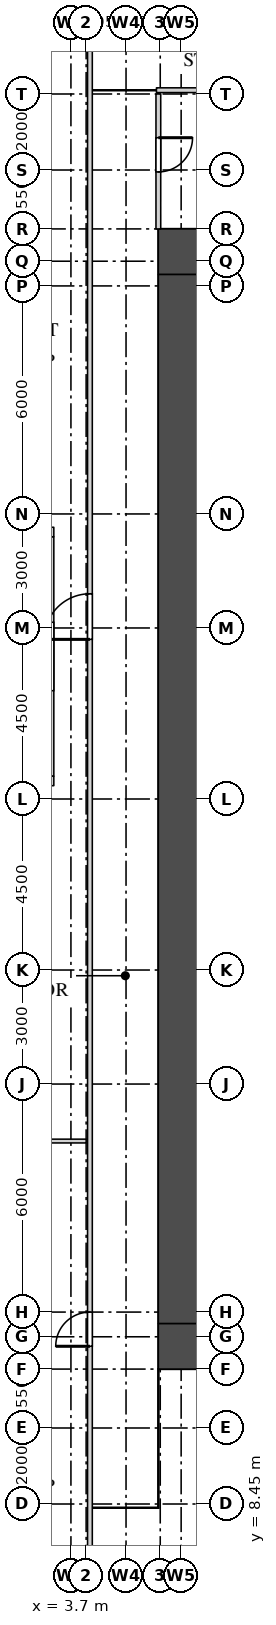
"""IFC4 building model, lengths in metres.
Left out: names, types, materials, properties, quantities, classifications, styles, units other than length and angle.
Written with IfcOpenShell. Run it as: python <this file> out.ifc"""

import sys

from ifc_helpers import new_model, si_unit, direction, frame, frame_2d, origin, place, context, subcontext, project, spatial, rectangle, extrude, source, transform, mapped, element, fill, save


model = new_model("IFC4")
c1 = context("Model", 3, precision=1e-05, world=origin(), true_north=direction((0.0, 1.0)))
c2 = subcontext(c1, "Body", "Model", "MODEL_VIEW")
j1 = project(units=[si_unit("LENGTHUNIT", "METRE"), si_unit("PLANEANGLEUNIT", "RADIAN")], contexts=[c1])
p1 = place(None, origin())
s1 = spatial("IfcSite", under=j1, at=p1, CompositionType="ELEMENT")
p2 = place(p1, origin())
s2 = spatial("IfcBuilding", under=s1, at=p2, CompositionType="ELEMENT")
p3 = place(p2, frame((0.0, 0.0, 60.0)))
s3 = spatial("IfcBuildingStorey", under=s2, at=p3, CompositionType="ELEMENT", Elevation=60.0)
m1 = source(origin(), c2, "Body", "SweptSolid", [
    extrude(rectangle(XDim=1.2, YDim=1.2, at=frame_2d((0.6, 0.0))), origin(), (0.0, 0.0, 1.0), 4.2),
])
for number, where, z_axis, x_axis in (
    (1, (6.0, 41.4, 0.0), (0.0, 0.0, 1.0), (1.0, 0.0, 0.0)),
    (2, (6.0, 12.6, 0.0), (0.0, 0.0, 1.0), (1.0, 0.0, 0.0)),
):
    element("IfcWall", number, at=place(p3, frame(where, z_axis=z_axis, x_axis=x_axis)), inside=s3, PredefinedType="SHEAR", context=c2, shape_type="MappedRepresentation", body=[
        mapped(m1, transform((0.0, 0.0, 0.0))),
    ])
m2 = source(origin(), c2, "Body", "SweptSolid", [
    extrude(rectangle(XDim=27.6, YDim=1.2, at=frame_2d((13.8, 0.0))), origin(), (0.0, 0.0, 1.0), 4.2),
])
p4 = place(p3, frame((6.6, 13.2, 0.0), z_axis=(0.0, 0.0, 1.0), x_axis=(0.0, 1.0, 0.0)))
e3 = element("IfcWall", 3, at=p4, inside=s3, PredefinedType="SHEAR", context=c2, shape_type="MappedRepresentation", body=[
    mapped(m2, transform((0.0, 0.0, 0.0))),
])
m3 = source(origin(), c2, "Body", "SweptSolid", [
    extrude(rectangle(XDim=6.3, YDim=0.25, at=frame_2d((3.15, 0.0))), origin(), (0.0, 0.0, 1.0), 4.2),
])
p5 = place(p3, frame((3.125, 27.6, 0.0), z_axis=(0.0, 0.0, 1.0), x_axis=(0.0, 1.0, 0.0)))
e4 = element("IfcWall", 4, at=p5, inside=s3, PredefinedType="SOLIDWALL", context=c2, shape_type="MappedRepresentation", body=[
    mapped(m3, transform((0.0, 0.0, 0.0))),
])
m4 = source(origin(), c2, "Body", "SweptSolid", [
    extrude(rectangle(XDim=1.6, YDim=2.4, at=frame_2d((0.8, 1.2))), frame((0.0, 0.135, 0.0), z_axis=(0.0, -1.0, 0.0), x_axis=(1.0, 0.0, 0.0)), (0.0, 0.0, 1.0), 0.27),
])
p6 = place(p5, frame((0.35, 0.0, 0.0)))
e5 = element("IfcOpeningElement", 5, at=p6, cuts=e4, PredefinedType="OPENING", context=c2, shape_type="MappedRepresentation", body=[
    mapped(m4, transform((0.0, 0.0, 0.0))),
])
p7 = place(p5, frame((4.35, 0.0, 0.0)))
e6 = element("IfcOpeningElement", 6, at=p7, cuts=e4, PredefinedType="OPENING", context=c2, shape_type="MappedRepresentation", body=[
    mapped(m4, transform((0.0, 0.0, 0.0))),
])
m5 = source(origin(), c2, "Body", "SweptSolid", [
    extrude(rectangle(XDim=1.8, YDim=2.4, at=frame_2d((0.9, 1.2))), frame((0.0, 0.135, 0.0), z_axis=(0.0, -1.0, 0.0), x_axis=(1.0, 0.0, 0.0)), (0.0, 0.0, 1.0), 0.27),
])
p8 = place(p5, frame((2.25, 0.0, 0.0)))
e7 = element("IfcOpeningElement", 7, at=p8, cuts=e4, PredefinedType="OPENING", context=c2, shape_type="MappedRepresentation", body=[
    mapped(m5, transform((0.0, 0.0, 0.0))),
])
m6 = source(origin(), c2, "Body", "SweptSolid", [
    extrude(rectangle(XDim=1.85, YDim=0.25, at=frame_2d((0.925, 0.0))), origin(), (0.0, 0.0, 1.0), 3.9),
])
for number, where, z_axis, x_axis in (
    (8, (1.4, 27.475, 0.0), (0.0, 0.0, 1.0), (1.0, 0.0, 0.0)),
    (9, (1.4, 34.025, 0.0), (0.0, 0.0, 1.0), (1.0, 0.0, 0.0)),
):
    element("IfcWall", number, at=place(p3, frame(where, z_axis=z_axis, x_axis=x_axis)), inside=s3, PredefinedType="SOLIDWALL", context=c2, shape_type="MappedRepresentation", body=[
        mapped(m6, transform((0.0, 0.0, 0.0))),
    ])
m7 = source(origin(), c2, "Body", "SweptSolid", [
    extrude(rectangle(XDim=41.8, YDim=0.125, at=frame_2d((20.9, 0.0))), origin(), (0.0, 0.0, 1.0), 4.3),
])
p9 = place(p3, frame((4.2, 6.15, 0.0), z_axis=(0.0, 0.0, 1.0), x_axis=(0.0, 1.0, 0.0)))
e10 = element("IfcWall", 10, at=p9, inside=s3, PredefinedType="PARTITIONING", context=c2, shape_type="MappedRepresentation", body=[
    mapped(m7, transform((0.0, 0.0, 0.0))),
])
m8 = source(origin(), c2, "Body", "SweptSolid", [
    extrude(rectangle(XDim=0.9, YDim=2.1, at=frame_2d((0.45, 1.05))), frame((0.0, 0.073, 0.0), z_axis=(0.0, -1.0, 0.0), x_axis=(1.0, 0.0, 0.0)), (0.0, 0.0, 1.0), 0.145),
])
p10 = place(p9, frame((6.45, 0.0, 0.0)))
e11 = element("IfcOpeningElement", 11, at=p10, cuts=e10, PredefinedType="OPENING", context=c2, shape_type="MappedRepresentation", body=[
    mapped(m8, transform((0.0, 0.0, 0.0))),
])
m9 = source(origin(), c2, "Body", "SweptSolid", [
    extrude(rectangle(XDim=1.2, YDim=2.1, at=frame_2d((0.6, 1.05))), frame((0.0, 0.073, 0.0), z_axis=(0.0, -1.0, 0.0), x_axis=(1.0, 0.0, 0.0)), (0.0, 0.0, 1.0), 0.145),
])
p11 = place(p9, frame((25.05, 0.0, 0.0)))
e12 = element("IfcOpeningElement", 12, at=p11, cuts=e10, PredefinedType="OPENING", context=c2, shape_type="MappedRepresentation", body=[
    mapped(m9, transform((0.0, 0.0, 0.0))),
])
m10 = source(origin(), c2, "Body", "SweptSolid", [
    extrude(rectangle(XDim=3.95, YDim=0.1, at=frame_2d((1.975, 0.0))), origin(), (0.0, 0.0, 1.0), 4.3),
])
p12 = place(p3, frame((0.15, 18.0, 0.0), z_axis=(0.0, 0.0, 1.0), x_axis=(1.0, 0.0, 0.0)))
e13 = element("IfcWall", 13, at=p12, inside=s3, PredefinedType="PARTITIONING", context=c2, shape_type="MappedRepresentation", body=[
    mapped(m10, transform((0.0, 0.0, 0.0))),
])
m11 = source(origin(), c2, "Body", "SweptSolid", [
    extrude(rectangle(XDim=3.55, YDim=0.125, at=frame_2d((1.775, 0.0))), origin(), (0.0, 0.0, 1.0), 4.3),
])
p13 = place(p3, frame((6.0, 42.0, 0.0), z_axis=(0.0, 0.0, 1.0), x_axis=(0.0, 1.0, 0.0)))
e14 = element("IfcWall", 14, at=p13, inside=s3, PredefinedType="PARTITIONING", context=c2, shape_type="MappedRepresentation", body=[
    mapped(m11, transform((0.0, 0.0, 0.0))),
])
p14 = place(p13, frame((1.5, 0.0, 0.0)))
e15 = element("IfcOpeningElement", 15, at=p14, cuts=e14, PredefinedType="OPENING", context=c2, shape_type="MappedRepresentation", body=[
    mapped(m8, transform((0.0, 0.0, 0.0))),
])
m12 = source(origin(), c2, "Body", "SweptSolid", [
    extrude(rectangle(XDim=7.95, YDim=0.125, at=frame_2d((3.975, 0.0))), origin(), (0.0, 0.0, 1.0), 4.3),
])
p15 = place(p3, frame((5.95, 45.65, 0.0), z_axis=(0.0, 0.0, 1.0), x_axis=(1.0, 0.0, 0.0)))
e16 = element("IfcWall", 16, at=p15, inside=s3, PredefinedType="PARTITIONING", context=c2, shape_type="MappedRepresentation", body=[
    mapped(m12, transform((0.0, 0.0, 0.0))),
])
p16 = place(p15, frame((3.3, 0.0, 0.0)))
e17 = element("IfcOpeningElement", 17, at=p16, cuts=e16, PredefinedType="OPENING", context=c2, shape_type="MappedRepresentation", body=[
    mapped(m8, transform((0.0, 0.0, 0.0))),
])
p17 = place(p15, frame((6.1, 0.0, 0.0)))
e18 = element("IfcOpeningElement", 18, at=p17, cuts=e16, PredefinedType="OPENING", context=c2, shape_type="MappedRepresentation", body=[
    mapped(m8, transform((0.0, 0.0, 0.0))),
])
m13 = source(origin(), c2, "Body", "SweptSolid", [
    extrude(rectangle(XDim=0.9, YDim=2.1, at=frame_2d((0.45, 1.05))), frame((0.0, 0.025, 0.0), z_axis=(0.0, -1.0, 0.0), x_axis=(1.0, 0.0, 0.0)), (0.0, 0.0, 1.0), 0.05),
])
p18 = place(p14, origin())
e19 = element("IfcDoor", 19, at=p18, inside=s3, OperationType="SINGLE_SWING_RIGHT", PredefinedType="DOOR", context=c2, shape_type="MappedRepresentation", body=[
    mapped(m13, transform((0.0, 0.0, 0.0))),
])
fill(e15, e19)
p19 = place(p10, origin())
e20 = element("IfcDoor", 20, at=p19, inside=s3, OperationType="SINGLE_SWING_RIGHT", PredefinedType="DOOR", context=c2, shape_type="MappedRepresentation", body=[
    mapped(m13, transform((0.0, 0.0, 0.0))),
])
fill(e11, e20)
m14 = source(origin(), c2, "Body", "SweptSolid", [
    extrude(rectangle(XDim=1.2, YDim=2.1, at=frame_2d((0.6, 1.05))), frame((0.0, 0.025, 0.0), z_axis=(0.0, -1.0, 0.0), x_axis=(1.0, 0.0, 0.0)), (0.0, 0.0, 1.0), 0.05),
])
p20 = place(p11, origin())
e21 = element("IfcDoor", 21, at=p20, inside=s3, OperationType="SINGLE_SWING_RIGHT", PredefinedType="DOOR", context=c2, shape_type="MappedRepresentation", body=[
    mapped(m14, transform((0.0, 0.0, 0.0))),
])
fill(e12, e21)
save(model, sys.argv[1])
